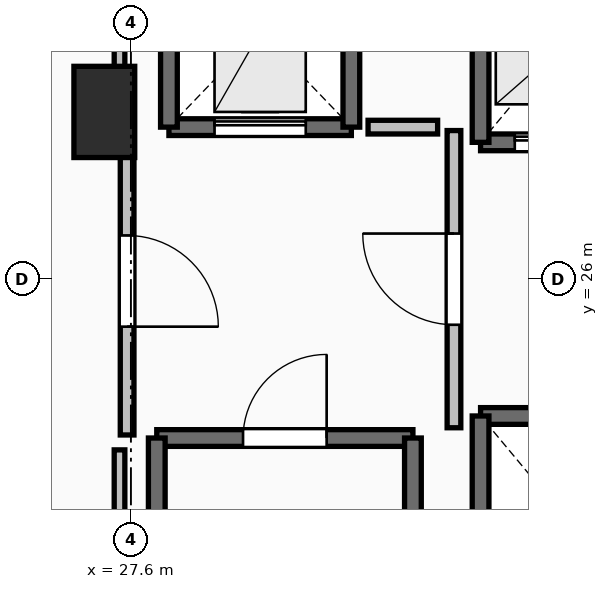
"""IFC4 building model, lengths in metres.
Left out: names, types, materials, properties, quantities, classifications, styles, units other than length and angle.
Written with IfcOpenShell. Run it as: python <this file> out.ifc"""

import sys

from ifc_helpers import new_model, si_unit, direction, frame, frame_2d, origin, origin_2d, place, context, subcontext, project, spatial, rectangle, extrude, element, fill, save


model = new_model("IFC4")
c1 = context("Model", 3, precision=1e-05, world=origin(), true_north=direction((0.0, 1.0)))
c2 = subcontext(c1, "Body", "Model", "MODEL_VIEW")
j1 = project(units=[si_unit("LENGTHUNIT", "METRE"), si_unit("PLANEANGLEUNIT", "RADIAN")], contexts=[c1])
p1 = place(None, origin())
s1 = spatial("IfcSite", under=j1, at=p1, CompositionType="ELEMENT")
p2 = place(p1, origin())
s2 = spatial("IfcBuilding", under=s1, at=p2, CompositionType="ELEMENT")
p3 = place(p2, frame((0.0, 0.0, 27.5)))
s3 = spatial("IfcBuildingStorey", under=s2, at=p3, CompositionType="ELEMENT", Elevation=27.5)
p4 = place(p3, frame((27.25, 28.2, 0.0), z_axis=(0.0, 0.0, 1.0), x_axis=(1.0, 0.0, 0.0)))
e1 = element("IfcColumn", 1, at=p4, inside=s3, PredefinedType="PILASTER", context=c2, shape_type="SweptSolid", body=[
    extrude(rectangle(XDim=0.8, YDim=1.2, at=origin_2d()), origin(), (0.0, 0.0, 1.0), 3.5),
])
p5 = place(p3, frame((27.94, 23.91, 0.0), z_axis=(0.0, 0.0, 1.0), x_axis=(1.0, 0.0, 0.0)))
e2 = element("IfcWall", 2, at=p5, inside=s3, PredefinedType="SOLIDWALL", context=c2, shape_type="SweptSolid", body=[
    extrude(rectangle(XDim=3.37, YDim=0.22, at=frame_2d((1.685, 0.0))), origin(), (0.0, 0.0, 1.0), 3.24),
])
p6 = place(p5, frame((1.135, 0.0, 0.0)))
e3 = element("IfcOpeningElement", 3, at=p6, cuts=e2, PredefinedType="OPENING", context=c2, shape_type="SweptSolid", body=[
    extrude(rectangle(XDim=1.1, YDim=2.15, at=frame_2d((0.55, 1.075))), frame((0.0, 0.125, 0.0), z_axis=(0.0, -1.0, 0.0), x_axis=(1.0, 0.0, 0.0)), (0.0, 0.0, 1.0), 0.25),
])
for number, where, z_axis, x_axis in (
    (4, (31.31, 23.91, 0.0), (0.0, 0.0, 1.0), (0.0, -1.0, 0.0)),
    (5, (27.94, 16.49, 0.0), (0.0, 0.0, 1.0), (0.0, 1.0, 0.0)),
):
    element("IfcWall", number, at=place(p3, frame(where, z_axis=z_axis, x_axis=x_axis)), inside=s3, PredefinedType="SOLIDWALL", context=c2, shape_type="SweptSolid", body=[
        extrude(rectangle(XDim=7.42, YDim=0.22, at=frame_2d((3.71, 0.0))), origin(), (0.0, 0.0, 1.0), 3.24),
    ])
p7 = place(p3, frame((32.2, 27.8, 0.0), z_axis=(0.0, 0.0, 1.0), x_axis=(1.0, 0.0, 0.0)))
e6 = element("IfcWall", 6, at=p7, inside=s3, PredefinedType="SOLIDWALL", context=c2, shape_type="SweptSolid", body=[
    extrude(rectangle(XDim=2.0, YDim=0.22, at=frame_2d((1.0, 0.0))), origin(), (0.0, 0.0, 1.0), 3.24),
])
p8 = place(p7, frame((0.45, 0.0, 0.0)))
e7 = element("IfcOpeningElement", 7, at=p8, cuts=e6, PredefinedType="OPENING", context=c2, shape_type="SweptSolid", body=[
    extrude(rectangle(XDim=1.1, YDim=2.2, at=frame_2d((0.55, 1.1))), frame((0.0, 0.125, 0.0), z_axis=(0.0, -1.0, 0.0), x_axis=(1.0, 0.0, 0.0)), (0.0, 0.0, 1.0), 0.25),
])
p9 = place(p3, frame((32.2, 30.2, 0.0), z_axis=(0.0, 0.0, 1.0), x_axis=(0.0, -1.0, 0.0)))
e8 = element("IfcWall", 8, at=p9, inside=s3, PredefinedType="SOLIDWALL", context=c2, shape_type="SweptSolid", body=[
    extrude(rectangle(XDim=2.4, YDim=0.22, at=frame_2d((1.2, 0.0))), origin(), (0.0, 0.0, 1.0), 3.24),
])
p10 = place(p3, frame((34.2, 24.2, 0.0), z_axis=(0.0, 0.0, 1.0), x_axis=(-1.0, 0.0, 0.0)))
e9 = element("IfcWall", 9, at=p10, inside=s3, PredefinedType="SOLIDWALL", context=c2, shape_type="SweptSolid", body=[
    extrude(rectangle(XDim=2.0, YDim=0.22, at=frame_2d((1.0, 0.0))), origin(), (0.0, 0.0, 1.0), 3.24),
])
p11 = place(p3, frame((32.2, 24.2, 0.0), z_axis=(0.0, 0.0, 1.0), x_axis=(0.0, -1.0, 0.0)))
e10 = element("IfcWall", 10, at=p11, inside=s3, PredefinedType="SOLIDWALL", context=c2, shape_type="SweptSolid", body=[
    extrude(rectangle(XDim=2.4, YDim=0.22, at=frame_2d((1.2, 0.0))), origin(), (0.0, 0.0, 1.0), 3.24),
])
p12 = place(p3, frame((28.1, 28.0, 0.0), z_axis=(0.0, 0.0, 1.0), x_axis=(1.0, 0.0, 0.0)))
e11 = element("IfcWall", 11, at=p12, inside=s3, PredefinedType="SHEAR", context=c2, shape_type="SweptSolid", body=[
    extrude(rectangle(XDim=2.4, YDim=0.22, at=frame_2d((1.2, 0.0))), origin(), (0.0, 0.0, 1.0), 3.24),
])
p13 = place(p12, frame((0.6, 0.0, 0.0)))
e12 = element("IfcOpeningElement", 12, at=p13, cuts=e11, PredefinedType="OPENING", context=c2, shape_type="SweptSolid", body=[
    extrude(rectangle(XDim=1.2, YDim=2.2, at=frame_2d((0.6, 1.1))), frame((0.0, 0.125, 0.0), z_axis=(0.0, -1.0, 0.0), x_axis=(1.0, 0.0, 0.0)), (0.0, 0.0, 1.0), 0.25),
])
for number, where, z_axis, x_axis in (
    (13, (30.5, 28.0, 0.0), (0.0, 0.0, 1.0), (0.0, 1.0, 0.0)),
    (14, (28.1, 30.5, 0.0), (0.0, 0.0, 1.0), (0.0, -1.0, 0.0)),
):
    element("IfcWall", number, at=place(p3, frame(where, z_axis=z_axis, x_axis=x_axis)), inside=s3, PredefinedType="SHEAR", context=c2, shape_type="SweptSolid", body=[
        extrude(rectangle(XDim=2.5, YDim=0.22, at=frame_2d((1.25, 0.0))), origin(), (0.0, 0.0, 1.0), 3.24),
    ])
p14 = place(p3, frame((31.85, 24.045, 0.0), z_axis=(0.0, 0.0, 1.0), x_axis=(0.0, 1.0, 0.0)))
e15 = element("IfcWall", 15, at=p14, inside=s3, PredefinedType="PARTITIONING", context=c2, shape_type="SweptSolid", body=[
    extrude(rectangle(XDim=3.91, YDim=0.18, at=frame_2d((1.955, 0.0))), origin(), (0.0, 0.0, 1.0), 3.24),
])
p15 = place(p14, frame((1.355, 0.0, 0.0)))
e16 = element("IfcOpeningElement", 16, at=p15, cuts=e15, PredefinedType="OPENING", context=c2, shape_type="SweptSolid", body=[
    extrude(rectangle(XDim=1.2, YDim=2.15, at=frame_2d((0.6, 1.075))), frame((0.0, 0.105, 0.0), z_axis=(0.0, -1.0, 0.0), x_axis=(1.0, 0.0, 0.0)), (0.0, 0.0, 1.0), 0.21),
])
p16 = place(p3, frame((27.55, 28.0, 0.0), z_axis=(0.0, 0.0, 1.0), x_axis=(0.0, -1.0, 0.0)))
e17 = element("IfcWall", 17, at=p16, inside=s3, PredefinedType="PARTITIONING", context=c2, shape_type="SweptSolid", body=[
    extrude(rectangle(XDim=4.05, YDim=0.18, at=frame_2d((2.025, 0.0))), origin(), (0.0, 0.0, 1.0), 3.24),
])
p17 = place(p16, frame((1.425, 0.0, 0.0)))
e18 = element("IfcOpeningElement", 18, at=p17, cuts=e17, PredefinedType="OPENING", context=c2, shape_type="SweptSolid", body=[
    extrude(rectangle(XDim=1.2, YDim=2.15, at=frame_2d((0.6, 1.075))), frame((0.0, 0.105, 0.0), z_axis=(0.0, -1.0, 0.0), x_axis=(1.0, 0.0, 0.0)), (0.0, 0.0, 1.0), 0.21),
])
p18 = place(p3, frame((31.635, 28.0, 0.0), z_axis=(0.0, 0.0, 1.0), x_axis=(-1.0, 0.0, 0.0)))
e19 = element("IfcWall", 19, at=p18, inside=s3, PredefinedType="PARTITIONING", context=c2, shape_type="SweptSolid", body=[
    extrude(rectangle(XDim=0.915, YDim=0.18, at=frame_2d((0.458, 0.0))), origin(), (0.0, 0.0, 1.0), 3.24),
])
p19 = place(p3, frame((27.45, 16.24, 0.0), z_axis=(0.0, 0.0, 1.0), x_axis=(0.0, 1.0, 0.0)))
e20 = element("IfcWall", 20, at=p19, inside=s3, PredefinedType="PARTITIONING", context=c2, shape_type="SweptSolid", body=[
    extrude(rectangle(XDim=7.514, YDim=0.14, at=frame_2d((3.757, 0.0))), origin(), (0.0, 0.0, 1.0), 2.432),
])
p20 = place(p3, frame((27.45, 28.196, 0.0), z_axis=(0.0, 0.0, 1.0), x_axis=(0.0, 1.0, 0.0)))
e21 = element("IfcWall", 21, at=p20, inside=s3, PredefinedType="PARTITIONING", context=c2, shape_type="SweptSolid", body=[
    extrude(rectangle(XDim=5.254, YDim=0.14, at=frame_2d((2.627, 0.0))), origin(), (0.0, 0.0, 1.0), 2.432),
])
p21 = place(p6, origin())
e22 = element("IfcDoor", 22, at=p21, inside=s3, OperationType="SINGLE_SWING_RIGHT", PredefinedType="DOOR", context=c2, shape_type="SweptSolid", body=[
    extrude(rectangle(XDim=1.1, YDim=2.15, at=frame_2d((0.55, 1.075))), frame((0.0, 0.025, 0.0), z_axis=(0.0, -1.0, 0.0), x_axis=(1.0, 0.0, 0.0)), (0.0, 0.0, 1.0), 0.05),
])
fill(e3, e22)
p22 = place(p8, origin())
e23 = element("IfcDoor", 23, at=p22, inside=s3, OperationType="SLIDING_TO_LEFT", PredefinedType="DOOR", context=c2, shape_type="SweptSolid", body=[
    extrude(rectangle(XDim=1.1, YDim=2.2, at=frame_2d((0.55, 1.1))), frame((0.0, 0.025, 0.0), z_axis=(0.0, -1.0, 0.0), x_axis=(1.0, 0.0, 0.0)), (0.0, 0.0, 1.0), 0.05),
])
fill(e7, e23)
p23 = place(p13, origin())
e24 = element("IfcDoor", 24, at=p23, inside=s3, OperationType="SLIDING_TO_LEFT", PredefinedType="DOOR", context=c2, shape_type="SweptSolid", body=[
    extrude(rectangle(XDim=1.2, YDim=2.2, at=frame_2d((0.6, 1.1))), frame((0.0, 0.025, 0.0), z_axis=(0.0, -1.0, 0.0), x_axis=(1.0, 0.0, 0.0)), (0.0, 0.0, 1.0), 0.05),
])
fill(e12, e24)
p24 = place(p15, origin())
e25 = element("IfcDoor", 25, at=p24, inside=s3, OperationType="SINGLE_SWING_RIGHT", PredefinedType="DOOR", context=c2, shape_type="SweptSolid", body=[
    extrude(rectangle(XDim=1.2, YDim=2.15, at=frame_2d((0.6, 1.075))), frame((0.0, 0.025, 0.0), z_axis=(0.0, -1.0, 0.0), x_axis=(1.0, 0.0, 0.0)), (0.0, 0.0, 1.0), 0.05),
])
fill(e16, e25)
p25 = place(p17, origin())
e26 = element("IfcDoor", 26, at=p25, inside=s3, OperationType="SINGLE_SWING_RIGHT", PredefinedType="DOOR", context=c2, shape_type="SweptSolid", body=[
    extrude(rectangle(XDim=1.2, YDim=2.15, at=frame_2d((0.6, 1.075))), frame((0.0, 0.025, 0.0), z_axis=(0.0, -1.0, 0.0), x_axis=(1.0, 0.0, 0.0)), (0.0, 0.0, 1.0), 0.05),
])
fill(e18, e26)
save(model, sys.argv[1])
